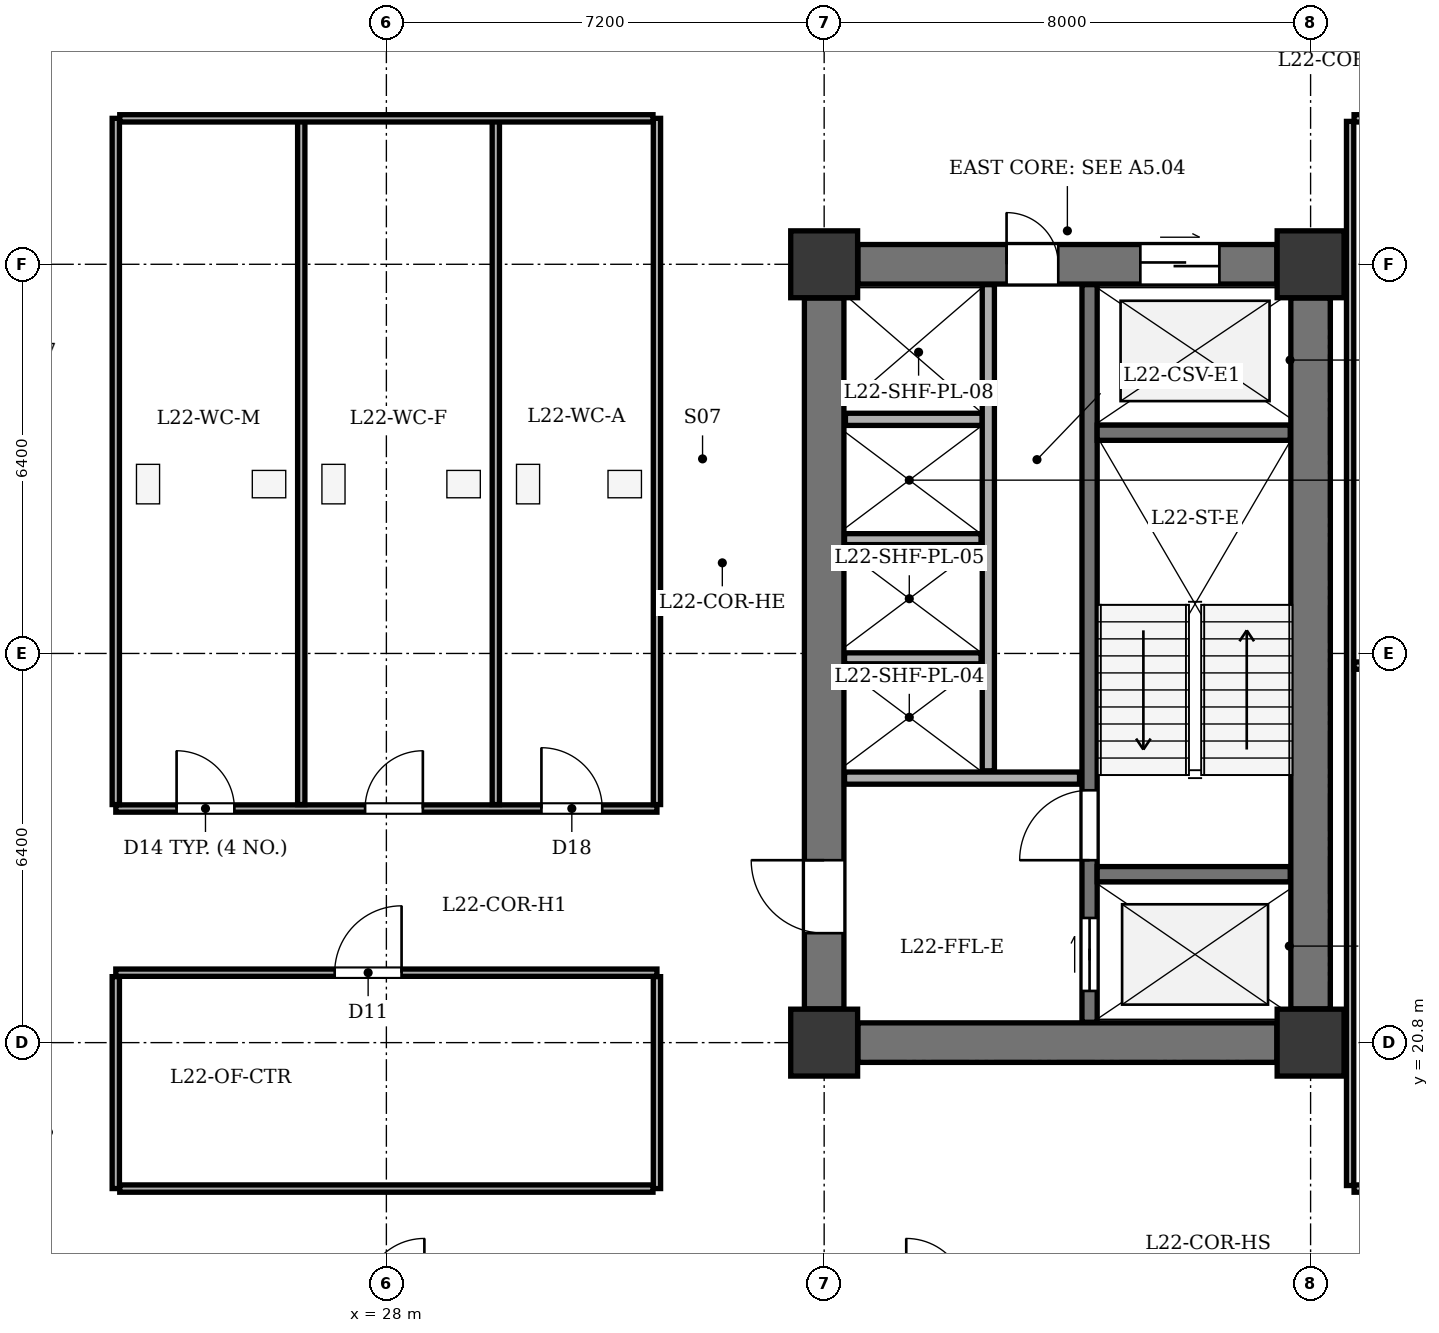
"""IFC4 building model, lengths in metres.
Left out: names, types, materials, properties, quantities, classifications, styles, units other than length and angle.
Written with IfcOpenShell. Run it as: python <this file> out.ifc"""

import sys

from ifc_helpers import new_model, si_unit, direction, frame, frame_2d, origin, origin_2d, place, context, subcontext, project, spatial, rectangle, extrude, element, fill, save


model = new_model("IFC4")
c1 = context("Model", 3, precision=1e-05, world=origin(), true_north=direction((0.0, 1.0)))
c2 = subcontext(c1, "Body", "Model", "MODEL_VIEW")
j1 = project(units=[si_unit("LENGTHUNIT", "METRE"), si_unit("PLANEANGLEUNIT", "RADIAN")], contexts=[c1])
p1 = place(None, origin())
s1 = spatial("IfcSite", under=j1, at=p1, CompositionType="ELEMENT")
p2 = place(p1, origin())
s2 = spatial("IfcBuilding", under=s1, at=p2, CompositionType="ELEMENT")
p3 = place(p2, frame((0.0, 0.0, 90.6)))
s3 = spatial("IfcBuildingStorey", under=s2, at=p3, CompositionType="ELEMENT", Elevation=90.6)
for number, where, z_axis, x_axis in (
    (1, (35.2, 20.8, 0.0), (0.0, 0.0, 1.0), (1.0, 0.0, 0.0)),
    (2, (43.2, 20.8, 0.0), (0.0, 0.0, 1.0), (1.0, 0.0, 0.0)),
    (3, (35.2, 33.6, 0.0), (0.0, 0.0, 1.0), (1.0, 0.0, 0.0)),
    (4, (43.2, 33.6, 0.0), (0.0, 0.0, 1.0), (1.0, 0.0, 0.0)),
):
    element("IfcColumn", number, at=place(p3, frame(where, z_axis=z_axis, x_axis=x_axis)), inside=s3, PredefinedType="COLUMN", context=c2, shape_type="SweptSolid", body=[
        extrude(rectangle(XDim=1.1, YDim=1.1, at=origin_2d()), origin(), (0.0, 0.0, 1.0), 3.9),
    ])
p4 = place(p3, frame((43.2, 21.355, 0.0), z_axis=(0.0, 0.0, 1.0), x_axis=(0.0, 1.0, 0.0)))
e5 = element("IfcWall", 5, at=p4, inside=s3, PredefinedType="SHEAR", context=c2, shape_type="SweptSolid", body=[
    extrude(rectangle(XDim=11.69, YDim=0.65, at=frame_2d((5.845, 0.0))), origin(), (0.0, 0.0, 1.0), 3.45),
])
p5 = place(p3, frame((35.755, 20.8, 0.0), z_axis=(0.0, 0.0, 1.0), x_axis=(1.0, 0.0, 0.0)))
e6 = element("IfcWall", 6, at=p5, inside=s3, PredefinedType="SHEAR", context=c2, shape_type="SweptSolid", body=[
    extrude(rectangle(XDim=6.89, YDim=0.65, at=frame_2d((3.445, 0.0))), origin(), (0.0, 0.0, 1.0), 3.45),
])
p6 = place(p3, frame((35.755, 33.6, 0.0), z_axis=(0.0, 0.0, 1.0), x_axis=(1.0, 0.0, 0.0)))
e7 = element("IfcWall", 7, at=p6, inside=s3, PredefinedType="SHEAR", context=c2, shape_type="SweptSolid", body=[
    extrude(rectangle(XDim=6.89, YDim=0.65, at=frame_2d((3.445, 0.0))), origin(), (0.0, 0.0, 1.0), 3.45),
])
p7 = place(p6, frame((4.645, 0.0, 0.0)))
e8 = element("IfcOpeningElement", 8, at=p7, cuts=e7, PredefinedType="OPENING", context=c2, shape_type="SweptSolid", body=[
    extrude(rectangle(XDim=1.3, YDim=2.15, at=frame_2d((0.65, 1.075))), frame((0.0, 0.335, 0.0), z_axis=(0.0, -1.0, 0.0), x_axis=(1.0, 0.0, 0.0)), (0.0, 0.0, 1.0), 0.67),
])
p8 = place(p6, frame((2.445, 0.0, 0.0)))
e9 = element("IfcOpeningElement", 9, at=p8, cuts=e7, PredefinedType="OPENING", context=c2, shape_type="SweptSolid", body=[
    extrude(rectangle(XDim=0.85, YDim=2.02, at=frame_2d((0.425, 1.01))), frame((0.0, 0.335, 0.0), z_axis=(0.0, -1.0, 0.0), x_axis=(1.0, 0.0, 0.0)), (0.0, 0.0, 1.0), 0.67),
])
p9 = place(p3, frame((35.2, 21.355, 0.0), z_axis=(0.0, 0.0, 1.0), x_axis=(0.0, 1.0, 0.0)))
e10 = element("IfcWall", 10, at=p9, inside=s3, PredefinedType="SHEAR", context=c2, shape_type="SweptSolid", body=[
    extrude(rectangle(XDim=11.69, YDim=0.65, at=frame_2d((5.845, 0.0))), origin(), (0.0, 0.0, 1.0), 3.45),
])
p10 = place(p9, frame((1.245, 0.0, 0.0)))
e11 = element("IfcOpeningElement", 11, at=p10, cuts=e10, PredefinedType="OPENING", context=c2, shape_type="SweptSolid", body=[
    extrude(rectangle(XDim=1.2, YDim=2.15, at=frame_2d((0.6, 1.075))), frame((0.0, 0.335, 0.0), z_axis=(0.0, -1.0, 0.0), x_axis=(1.0, 0.0, 0.0)), (0.0, 0.0, 1.0), 0.67),
])
p11 = place(p3, frame((39.565, 21.135, 0.0), z_axis=(0.0, 0.0, 1.0), x_axis=(0.0, 1.0, 0.0)))
e12 = element("IfcWall", 12, at=p11, inside=s3, PredefinedType="SHEAR", context=c2, shape_type="SweptSolid", body=[
    extrude(rectangle(XDim=12.13, YDim=0.25, at=frame_2d((6.065, 0.0))), origin(), (0.0, 0.0, 1.0), 3.45),
])
p12 = place(p11, frame((0.515, 0.0, 0.0)))
e13 = element("IfcOpeningElement", 13, at=p12, cuts=e12, PredefinedType="OPENING", context=c2, shape_type="SweptSolid", body=[
    extrude(rectangle(XDim=1.2, YDim=2.15, at=frame_2d((0.6, 1.075))), frame((0.0, 0.135, 0.0), z_axis=(0.0, -1.0, 0.0), x_axis=(1.0, 0.0, 0.0)), (0.0, 0.0, 1.0), 0.27),
])
p13 = place(p11, frame((2.665, 0.0, 0.0)))
e14 = element("IfcOpeningElement", 14, at=p13, cuts=e12, PredefinedType="OPENING", context=c2, shape_type="SweptSolid", body=[
    extrude(rectangle(XDim=1.15, YDim=2.15, at=frame_2d((0.575, 1.075))), frame((0.0, 0.135, 0.0), z_axis=(0.0, -1.0, 0.0), x_axis=(1.0, 0.0, 0.0)), (0.0, 0.0, 1.0), 0.27),
])
for number, where, z_axis, x_axis in (
    (15, (39.69, 23.57, 0.0), (0.0, 0.0, 1.0), (1.0, 0.0, 0.0)),
    (16, (39.69, 30.83, 0.0), (0.0, 0.0, 1.0), (1.0, 0.0, 0.0)),
):
    element("IfcWall", number, at=place(p3, frame(where, z_axis=z_axis, x_axis=x_axis)), inside=s3, PredefinedType="SHEAR", context=c2, shape_type="SweptSolid", body=[
        extrude(rectangle(XDim=3.175, YDim=0.25, at=frame_2d((1.587, 0.0))), origin(), (0.0, 0.0, 1.0), 3.45),
    ])
p14 = place(p3, frame((35.535, 25.15, 0.0), z_axis=(0.0, 0.0, 1.0), x_axis=(1.0, 0.0, 0.0)))
e17 = element("IfcWall", 17, at=p14, inside=s3, PredefinedType="SOLIDWALL", context=c2, shape_type="SweptSolid", body=[
    extrude(rectangle(XDim=3.865, YDim=0.2, at=frame_2d((1.933, 0.0))), origin(), (0.0, 0.0, 1.0), 3.45),
])
p15 = place(p3, frame((35.55, 31.05, 0.0), z_axis=(0.0, 0.0, 1.0), x_axis=(1.0, 0.0, 0.0)))
e18 = element("IfcWall", 18, at=p15, inside=s3, PredefinedType="SOLIDWALL", context=c2, shape_type="SweptSolid", body=[
    extrude(rectangle(XDim=2.25, YDim=0.2, at=frame_2d((1.125, 0.0))), origin(), (0.0, 0.0, 1.0), 3.45),
])
p16 = place(p3, frame((37.9, 25.27, 0.0), z_axis=(0.0, 0.0, 1.0), x_axis=(0.0, 1.0, 0.0)))
e19 = element("IfcWall", 19, at=p16, inside=s3, PredefinedType="SOLIDWALL", context=c2, shape_type="SweptSolid", body=[
    extrude(rectangle(XDim=7.995, YDim=0.2, at=frame_2d((3.998, 0.0))), origin(), (0.0, 0.0, 1.0), 3.45),
])
for number, where, z_axis, x_axis in (
    (20, (35.535, 27.12, 0.0), (0.0, 0.0, 1.0), (1.0, 0.0, 0.0)),
    (21, (35.535, 29.08, 0.0), (0.0, 0.0, 1.0), (1.0, 0.0, 0.0)),
):
    element("IfcWall", number, at=place(p3, frame(where, z_axis=z_axis, x_axis=x_axis)), inside=s3, PredefinedType="PARTITIONING", context=c2, shape_type="SweptSolid", body=[
        extrude(rectangle(XDim=2.245, YDim=0.18, at=frame_2d((1.123, 0.0))), origin(), (0.0, 0.0, 1.0), 3.45),
    ])
p17 = place(p3, frame((23.55, 24.65, 0.0), z_axis=(0.0, 0.0, 1.0), x_axis=(1.0, 0.0, 0.0)))
e22 = element("IfcWall", 22, at=p17, inside=s3, PredefinedType="PARTITIONING", context=c2, shape_type="SweptSolid", body=[
    extrude(rectangle(XDim=8.9, YDim=0.12, at=frame_2d((4.45, 0.0))), origin(), (0.0, 0.0, 1.0), 2.885),
])
p18 = place(p17, frame((1.0, 0.0, 0.0)))
e23 = element("IfcOpeningElement", 23, at=p18, cuts=e22, PredefinedType="OPENING", context=c2, shape_type="SweptSolid", body=[
    extrude(rectangle(XDim=0.95, YDim=2.1, at=frame_2d((0.475, 1.05))), frame((0.0, 0.07, 0.0), z_axis=(0.0, -1.0, 0.0), x_axis=(1.0, 0.0, 0.0)), (0.0, 0.0, 1.0), 0.14),
])
p19 = place(p17, frame((4.1, 0.0, 0.0)))
e24 = element("IfcOpeningElement", 24, at=p19, cuts=e22, PredefinedType="OPENING", context=c2, shape_type="SweptSolid", body=[
    extrude(rectangle(XDim=0.95, YDim=2.1, at=frame_2d((0.475, 1.05))), frame((0.0, 0.07, 0.0), z_axis=(0.0, -1.0, 0.0), x_axis=(1.0, 0.0, 0.0)), (0.0, 0.0, 1.0), 0.14),
])
p20 = place(p17, frame((7.0, 0.0, 0.0)))
e25 = element("IfcOpeningElement", 25, at=p20, cuts=e22, PredefinedType="OPENING", context=c2, shape_type="SweptSolid", body=[
    extrude(rectangle(XDim=1.0, YDim=2.1, at=frame_2d((0.5, 1.05))), frame((0.0, 0.07, 0.0), z_axis=(0.0, -1.0, 0.0), x_axis=(1.0, 0.0, 0.0)), (0.0, 0.0, 1.0), 0.14),
])
for number, where, z_axis, x_axis in (
    (26, (23.55, 24.715, 0.0), (0.0, 0.0, 1.0), (0.0, 1.0, 0.0)),
    (27, (32.45, 24.715, 0.0), (0.0, 0.0, 1.0), (0.0, 1.0, 0.0)),
    (28, (26.6, 24.715, 0.0), (0.0, 0.0, 1.0), (0.0, 1.0, 0.0)),
):
    element("IfcWall", number, at=place(p3, frame(where, z_axis=z_axis, x_axis=x_axis)), inside=s3, PredefinedType="PARTITIONING", context=c2, shape_type="SweptSolid", body=[
        extrude(rectangle(XDim=11.285, YDim=0.12, at=frame_2d((5.643, 0.0))), origin(), (0.0, 0.0, 1.0), 3.45),
    ])
p21 = place(p3, frame((29.8, 24.715, 0.0), z_axis=(0.0, 0.0, 1.0), x_axis=(0.0, 1.0, 0.0)))
e29 = element("IfcWall", 29, at=p21, inside=s3, PredefinedType="PARTITIONING", context=c2, shape_type="SweptSolid", body=[
    extrude(rectangle(XDim=11.285, YDim=0.12, at=frame_2d((5.643, 0.0))), origin(), (0.0, 0.0, 1.0), 2.885),
])
p22 = place(p3, frame((23.615, 36.0, 0.0), z_axis=(0.0, 0.0, 1.0), x_axis=(1.0, 0.0, 0.0)))
e30 = element("IfcWall", 30, at=p22, inside=s3, PredefinedType="PARTITIONING", context=c2, shape_type="SweptSolid", body=[
    extrude(rectangle(XDim=8.77, YDim=0.12, at=frame_2d((4.385, 0.0))), origin(), (0.0, 0.0, 1.0), 3.45),
])
p23 = place(p3, frame((23.55, 21.95, 0.0), z_axis=(0.0, 0.0, 1.0), x_axis=(1.0, 0.0, 0.0)))
e31 = element("IfcWall", 31, at=p23, inside=s3, PredefinedType="PARTITIONING", context=c2, shape_type="SweptSolid", body=[
    extrude(rectangle(XDim=8.9, YDim=0.12, at=frame_2d((4.45, 0.0))), origin(), (0.0, 0.0, 1.0), 2.885),
])
p24 = place(p23, frame((3.6, 0.0, 0.0)))
e32 = element("IfcOpeningElement", 32, at=p24, cuts=e31, PredefinedType="OPENING", context=c2, shape_type="SweptSolid", body=[
    extrude(rectangle(XDim=1.1, YDim=2.15, at=frame_2d((0.55, 1.075))), frame((0.0, 0.07, 0.0), z_axis=(0.0, -1.0, 0.0), x_axis=(1.0, 0.0, 0.0)), (0.0, 0.0, 1.0), 0.14),
])
for number, where, z_axis, x_axis in (
    (33, (23.55, 18.4, 0.0), (0.0, 0.0, 1.0), (0.0, 1.0, 0.0)),
    (34, (32.45, 18.4, 0.0), (0.0, 0.0, 1.0), (0.0, 1.0, 0.0)),
):
    element("IfcWall", number, at=place(p3, frame(where, z_axis=z_axis, x_axis=x_axis)), inside=s3, PredefinedType="PARTITIONING", context=c2, shape_type="SweptSolid", body=[
        extrude(rectangle(XDim=3.485, YDim=0.12, at=frame_2d((1.743, 0.0))), origin(), (0.0, 0.0, 1.0), 3.45),
    ])
p25 = place(p3, frame((23.615, 18.4, 0.0), z_axis=(0.0, 0.0, 1.0), x_axis=(1.0, 0.0, 0.0)))
e35 = element("IfcWall", 35, at=p25, inside=s3, PredefinedType="PARTITIONING", context=c2, shape_type="SweptSolid", body=[
    extrude(rectangle(XDim=8.77, YDim=0.12, at=frame_2d((4.385, 0.0))), origin(), (0.0, 0.0, 1.0), 3.45),
])
p26 = place(p3, frame((43.85, 18.45, 0.0), z_axis=(0.0, 0.0, 1.0), x_axis=(0.0, 1.0, 0.0)))
e36 = element("IfcWall", 36, at=p26, inside=s3, PredefinedType="PARTITIONING", context=c2, shape_type="SweptSolid", body=[
    extrude(rectangle(XDim=17.5, YDim=0.12, at=frame_2d((8.75, 0.0))), origin(), (0.0, 0.0, 1.0), 2.035),
])
p27 = place(p3, frame((43.915, 18.4, 0.0), z_axis=(0.0, 0.0, 1.0), x_axis=(1.0, 0.0, 0.0)))
e37 = element("IfcWall", 37, at=p27, inside=s3, PredefinedType="PARTITIONING", context=c2, shape_type="SweptSolid", body=[
    extrude(rectangle(XDim=11.38, YDim=0.12, at=frame_2d((5.69, 0.0))), origin(), (0.0, 0.0, 1.0), 3.45),
])
p28 = place(p27, frame((1.485, 0.0, 0.0)))
e38 = element("IfcOpeningElement", 38, at=p28, cuts=e37, PredefinedType="OPENING", context=c2, shape_type="SweptSolid", body=[
    extrude(rectangle(XDim=0.95, YDim=2.1, at=frame_2d((0.475, 1.05))), frame((0.0, 0.07, 0.0), z_axis=(0.0, -1.0, 0.0), x_axis=(1.0, 0.0, 0.0)), (0.0, 0.0, 1.0), 0.14),
])
p29 = place(p3, frame((43.915, 36.0, 0.0), z_axis=(0.0, 0.0, 1.0), x_axis=(1.0, 0.0, 0.0)))
e39 = element("IfcWall", 39, at=p29, inside=s3, PredefinedType="PARTITIONING", context=c2, shape_type="SweptSolid", body=[
    extrude(rectangle(XDim=11.38, YDim=0.12, at=frame_2d((5.69, 0.0))), origin(), (0.0, 0.0, 1.0), 3.45),
])
p30 = place(p29, frame((1.485, 0.0, 0.0)))
e40 = element("IfcOpeningElement", 40, at=p30, cuts=e39, PredefinedType="OPENING", context=c2, shape_type="SweptSolid", body=[
    extrude(rectangle(XDim=0.95, YDim=2.1, at=frame_2d((0.475, 1.05))), frame((0.0, 0.07, 0.0), z_axis=(0.0, -1.0, 0.0), x_axis=(1.0, 0.0, 0.0)), (0.0, 0.0, 1.0), 0.14),
])
p31 = place(p3, frame((43.915, 27.0, 0.0), z_axis=(0.0, 0.0, 1.0), x_axis=(1.0, 0.0, 0.0)))
e41 = element("IfcWall", 41, at=p31, inside=s3, PredefinedType="PARTITIONING", context=c2, shape_type="SweptSolid", body=[
    extrude(rectangle(XDim=11.38, YDim=0.12, at=frame_2d((5.69, 0.0))), origin(), (0.0, 0.0, 1.0), 2.885),
])
p32 = place(p31, frame((1.985, 0.0, 0.0)))
e42 = element("IfcOpeningElement", 42, at=p32, cuts=e41, PredefinedType="OPENING", context=c2, shape_type="SweptSolid", body=[
    extrude(rectangle(XDim=0.9, YDim=2.05, at=frame_2d((0.45, 1.025))), frame((0.0, 0.07, 0.0), z_axis=(0.0, -1.0, 0.0), x_axis=(1.0, 0.0, 0.0)), (0.0, 0.0, 1.0), 0.14),
])
p33 = place(p7, origin())
e43 = element("IfcDoor", 43, at=p33, inside=s3, OperationType="DOUBLE_DOOR_SLIDING", PredefinedType="DOOR", context=c2, shape_type="SweptSolid", body=[
    extrude(rectangle(XDim=1.3, YDim=2.15, at=frame_2d((0.65, 1.075))), frame((0.0, 0.025, 0.0), z_axis=(0.0, -1.0, 0.0), x_axis=(1.0, 0.0, 0.0)), (0.0, 0.0, 1.0), 0.05),
])
fill(e8, e43)
p34 = place(p8, origin())
e44 = element("IfcDoor", 44, at=p34, inside=s3, OperationType="SINGLE_SWING_LEFT", PredefinedType="DOOR", context=c2, shape_type="SweptSolid", body=[
    extrude(rectangle(XDim=0.85, YDim=2.02, at=frame_2d((0.425, 1.01))), frame((0.0, 0.025, 0.0), z_axis=(0.0, -1.0, 0.0), x_axis=(1.0, 0.0, 0.0)), (0.0, 0.0, 1.0), 0.05),
])
fill(e9, e44)
p35 = place(p10, origin())
e45 = element("IfcDoor", 45, at=p35, inside=s3, OperationType="SINGLE_SWING_RIGHT", PredefinedType="DOOR", context=c2, shape_type="SweptSolid", body=[
    extrude(rectangle(XDim=1.2, YDim=2.15, at=frame_2d((0.6, 1.075))), frame((0.0, 0.025, 0.0), z_axis=(0.0, -1.0, 0.0), x_axis=(1.0, 0.0, 0.0)), (0.0, 0.0, 1.0), 0.05),
])
fill(e11, e45)
p36 = place(p12, origin())
e46 = element("IfcDoor", 46, at=p36, inside=s3, OperationType="DOUBLE_DOOR_SLIDING", PredefinedType="DOOR", context=c2, shape_type="SweptSolid", body=[
    extrude(rectangle(XDim=1.2, YDim=2.15, at=frame_2d((0.6, 1.075))), frame((0.0, 0.025, 0.0), z_axis=(0.0, -1.0, 0.0), x_axis=(1.0, 0.0, 0.0)), (0.0, 0.0, 1.0), 0.05),
])
fill(e13, e46)
p37 = place(p13, origin())
e47 = element("IfcDoor", 47, at=p37, inside=s3, OperationType="SINGLE_SWING_LEFT", PredefinedType="DOOR", context=c2, shape_type="SweptSolid", body=[
    extrude(rectangle(XDim=1.15, YDim=2.15, at=frame_2d((0.575, 1.075))), frame((0.0, 0.025, 0.0), z_axis=(0.0, -1.0, 0.0), x_axis=(1.0, 0.0, 0.0)), (0.0, 0.0, 1.0), 0.05),
])
fill(e14, e47)
p38 = place(p18, origin())
e48 = element("IfcDoor", 48, at=p38, inside=s3, OperationType="SINGLE_SWING_LEFT", PredefinedType="DOOR", context=c2, shape_type="SweptSolid", body=[
    extrude(rectangle(XDim=0.95, YDim=2.1, at=frame_2d((0.475, 1.05))), frame((0.0, 0.025, 0.0), z_axis=(0.0, -1.0, 0.0), x_axis=(1.0, 0.0, 0.0)), (0.0, 0.0, 1.0), 0.05),
])
fill(e23, e48)
p39 = place(p19, origin())
e49 = element("IfcDoor", 49, at=p39, inside=s3, OperationType="SINGLE_SWING_RIGHT", PredefinedType="DOOR", context=c2, shape_type="SweptSolid", body=[
    extrude(rectangle(XDim=0.95, YDim=2.1, at=frame_2d((0.475, 1.05))), frame((0.0, 0.025, 0.0), z_axis=(0.0, -1.0, 0.0), x_axis=(1.0, 0.0, 0.0)), (0.0, 0.0, 1.0), 0.05),
])
fill(e24, e49)
p40 = place(p20, origin())
e50 = element("IfcDoor", 50, at=p40, inside=s3, OperationType="SINGLE_SWING_LEFT", PredefinedType="DOOR", context=c2, shape_type="SweptSolid", body=[
    extrude(rectangle(XDim=1.0, YDim=2.1, at=frame_2d((0.5, 1.05))), frame((0.0, 0.025, 0.0), z_axis=(0.0, -1.0, 0.0), x_axis=(1.0, 0.0, 0.0)), (0.0, 0.0, 1.0), 0.05),
])
fill(e25, e50)
p41 = place(p24, origin())
e51 = element("IfcDoor", 51, at=p41, inside=s3, OperationType="SINGLE_SWING_RIGHT", PredefinedType="DOOR", context=c2, shape_type="SweptSolid", body=[
    extrude(rectangle(XDim=1.1, YDim=2.15, at=frame_2d((0.55, 1.075))), frame((0.0, 0.025, 0.0), z_axis=(0.0, -1.0, 0.0), x_axis=(1.0, 0.0, 0.0)), (0.0, 0.0, 1.0), 0.05),
])
fill(e32, e51)
save(model, sys.argv[1])
